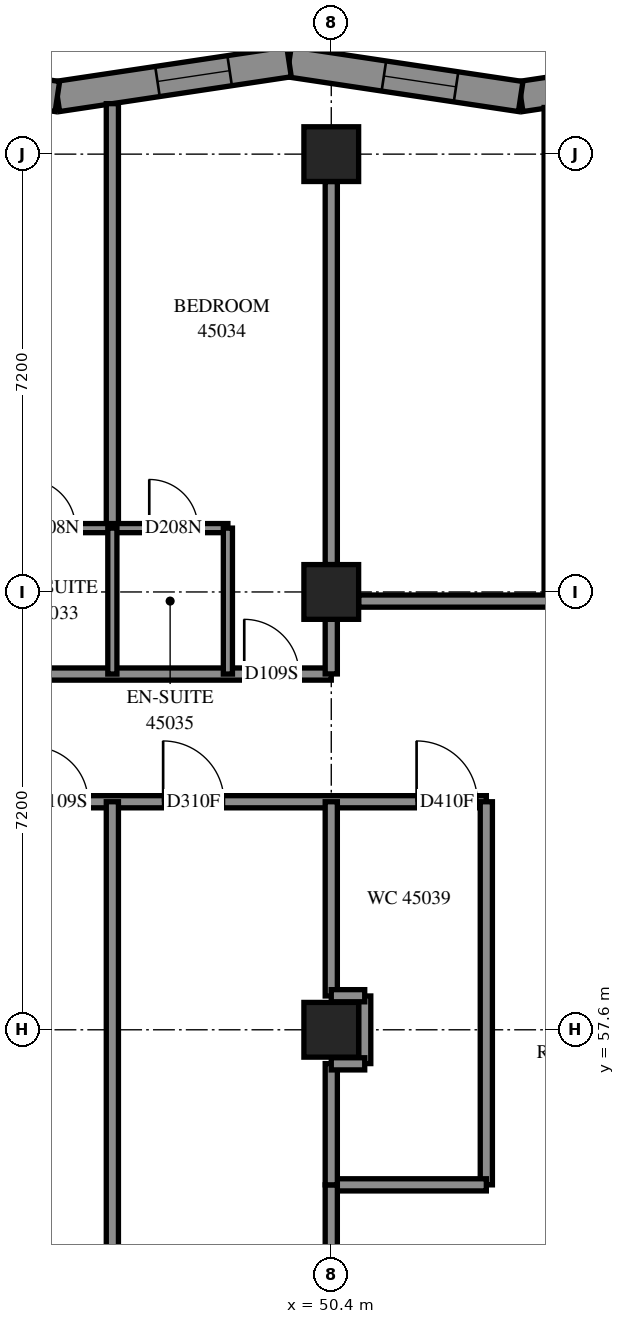
"""IFC4 building model, lengths in metres.
Left out: names, types, materials, properties, quantities, classifications, styles, units other than length and angle.
Written with IfcOpenShell. Run it as: python <this file> out.ifc"""

import sys

from ifc_helpers import new_model, si_unit, direction, frame, frame_2d, origin, origin_2d, place, context, subcontext, project, spatial, polyline, rectangle, outline, extrude, element, fill, save


model = new_model("IFC4")
c1 = context("Model", 3, precision=1e-05, world=origin(), true_north=direction((0.0, 1.0)))
c2 = subcontext(c1, "Body", "Model", "MODEL_VIEW")
j1 = project(units=[si_unit("LENGTHUNIT", "METRE"), si_unit("PLANEANGLEUNIT", "RADIAN")], contexts=[c1])
p1 = place(None, origin())
s1 = spatial("IfcSite", under=j1, at=p1, CompositionType="ELEMENT")
p2 = place(p1, origin())
s2 = spatial("IfcBuilding", under=s1, at=p2, CompositionType="ELEMENT")
p3 = place(p2, frame((0.0, 0.0, 166.0)))
s3 = spatial("IfcBuildingStorey", under=s2, at=p3, CompositionType="ELEMENT", Elevation=166.0)
for number, where, z_axis, x_axis in (
    (1, (50.4, 57.6, 0.0), (0.0, 0.0, 1.0), (1.0, 0.0, 0.0)),
    (2, (50.4, 64.8, 0.0), (0.0, 0.0, 1.0), (1.0, 0.0, 0.0)),
    (3, (50.4, 72.0, 0.0), (0.0, 0.0, 1.0), (1.0, 0.0, 0.0)),
):
    element("IfcColumn", number, at=place(p3, frame(where, z_axis=z_axis, x_axis=x_axis)), inside=s3, PredefinedType="COLUMN", context=c2, shape_type="SweptSolid", body=[
        extrude(rectangle(XDim=0.9, YDim=0.9, at=origin_2d()), origin(), (0.0, 0.0, 1.0), 3.1),
    ])
p4 = place(p3, frame((57.325, 73.519, 0.0), z_axis=(0.0, 0.0, 1.0), x_axis=(-0.9889155896, -0.1484788086, 0.0)))
e4 = element("IfcWall", 4, at=p4, inside=s3, PredefinedType="SOLIDWALL", context=c2, shape_type="SweptSolid", body=[
    extrude(outline(polyline([(-0.037, -0.25), (3.815, -0.25), (3.89, 0.25), (0.037, 0.25), (-0.037, -0.25)])), origin(), (0.0, 0.0, 1.0), 3.1),
])
p5 = place(p4, frame((0.4, 0.0, 0.45)))
e5 = element("IfcOpeningElement", 5, at=p5, cuts=e4, PredefinedType="OPENING", context=c2, shape_type="SweptSolid", body=[
    extrude(rectangle(XDim=2.8, YDim=2.5, at=frame_2d((1.4, 1.25))), frame((0.0, 0.26, 0.0), z_axis=(0.0, -1.0, 0.0), x_axis=(1.0, 0.0, 0.0)), (0.0, 0.0, 1.0), 0.52),
])
p6 = place(p3, frame((53.515, 72.947, 0.0), z_axis=(0.0, 0.0, 1.0), x_axis=(-0.9889150173, 0.1484826202, 0.0)))
e6 = element("IfcWall", 6, at=p6, inside=s3, PredefinedType="SOLIDWALL", context=c2, shape_type="SweptSolid", body=[
    extrude(outline(polyline([(0.037, -0.25), (3.89, -0.25), (3.815, 0.25), (-0.037, 0.25), (0.037, -0.25)])), origin(), (0.0, 0.0, 1.0), 3.1),
])
p7 = place(p6, frame((1.075, 0.0, 0.45)))
e7 = element("IfcOpeningElement", 7, at=p7, cuts=e6, PredefinedType="OPENING", context=c2, shape_type="SweptSolid", body=[
    extrude(rectangle(XDim=1.2, YDim=2.5, at=frame_2d((0.6, 1.25))), frame((0.0, 0.26, 0.0), z_axis=(0.0, -1.0, 0.0), x_axis=(1.0, 0.0, 0.0)), (0.0, 0.0, 1.0), 0.52),
])
p8 = place(p3, frame((49.705, 73.519, 0.0), z_axis=(0.0, 0.0, 1.0), x_axis=(-0.9889155896, -0.1484788086, 0.0)))
e8 = element("IfcWall", 8, at=p8, inside=s3, PredefinedType="SOLIDWALL", context=c2, shape_type="SweptSolid", body=[
    extrude(outline(polyline([(-0.037, -0.25), (3.815, -0.25), (3.89, 0.25), (0.037, 0.25), (-0.037, -0.25)])), origin(), (0.0, 0.0, 1.0), 3.1),
])
p9 = place(p8, frame((0.988, 0.0, 0.45)))
e9 = element("IfcOpeningElement", 9, at=p9, cuts=e8, PredefinedType="OPENING", context=c2, shape_type="SweptSolid", body=[
    extrude(rectangle(XDim=1.2, YDim=2.5, at=frame_2d((0.6, 1.25))), frame((0.0, 0.26, 0.0), z_axis=(0.0, -1.0, 0.0), x_axis=(1.0, 0.0, 0.0)), (0.0, 0.0, 1.0), 0.52),
])
p10 = place(p3, frame((45.896, 72.947, 0.0), z_axis=(0.0, 0.0, 1.0), x_axis=(-0.9889150173, 0.1484826202, 0.0)))
e10 = element("IfcWall", 10, at=p10, inside=s3, PredefinedType="SOLIDWALL", context=c2, shape_type="SweptSolid", body=[
    extrude(outline(polyline([(0.037, -0.25), (3.89, -0.25), (3.815, 0.25), (-0.037, 0.25), (0.037, -0.25)])), origin(), (0.0, 0.0, 1.0), 3.1),
])
p11 = place(p10, frame((0.863, 0.0, 0.45)))
e11 = element("IfcOpeningElement", 11, at=p11, cuts=e10, PredefinedType="OPENING", context=c2, shape_type="SweptSolid", body=[
    extrude(rectangle(XDim=1.2, YDim=2.5, at=frame_2d((0.6, 1.25))), frame((0.0, 0.26, 0.0), z_axis=(0.0, -1.0, 0.0), x_axis=(1.0, 0.0, 0.0)), (0.0, 0.0, 1.0), 0.52),
])
p12 = place(p3, frame((36.0, 61.35, 0.0), z_axis=(0.0, 0.0, 1.0), x_axis=(1.0, 0.0, 0.0)))
e12 = element("IfcWall", 12, at=p12, inside=s3, PredefinedType="PARTITIONING", context=c2, shape_type="SweptSolid", body=[
    extrude(rectangle(XDim=16.95, YDim=0.2, at=frame_2d((8.475, 0.0))), origin(), (0.0, 0.0, 1.0), 3.1),
])
p13 = place(p12, frame((2.3, 0.0, 0.0)))
e13 = element("IfcOpeningElement", 13, at=p13, cuts=e12, PredefinedType="OPENING", context=c2, shape_type="SweptSolid", body=[
    extrude(rectangle(XDim=0.9, YDim=2.1, at=frame_2d((0.45, 1.05))), frame((0.0, 0.11, 0.0), z_axis=(0.0, -1.0, 0.0), x_axis=(1.0, 0.0, 0.0)), (0.0, 0.0, 1.0), 0.22),
])
p14 = place(p12, frame((4.125, 0.0, 0.0)))
e14 = element("IfcOpeningElement", 14, at=p14, cuts=e12, PredefinedType="OPENING", context=c2, shape_type="SweptSolid", body=[
    extrude(rectangle(XDim=1.0, YDim=2.1, at=frame_2d((0.5, 1.05))), frame((0.0, 0.11, 0.0), z_axis=(0.0, -1.0, 0.0), x_axis=(1.0, 0.0, 0.0)), (0.0, 0.0, 1.0), 0.22),
])
p15 = place(p12, frame((9.5, 0.0, 0.0)))
e15 = element("IfcOpeningElement", 15, at=p15, cuts=e12, PredefinedType="OPENING", context=c2, shape_type="SweptSolid", body=[
    extrude(rectangle(XDim=0.9, YDim=2.1, at=frame_2d((0.45, 1.05))), frame((0.0, 0.11, 0.0), z_axis=(0.0, -1.0, 0.0), x_axis=(1.0, 0.0, 0.0)), (0.0, 0.0, 1.0), 0.22),
])
p16 = place(p12, frame((11.635, 0.0, 0.0)))
e16 = element("IfcOpeningElement", 16, at=p16, cuts=e12, PredefinedType="OPENING", context=c2, shape_type="SweptSolid", body=[
    extrude(rectangle(XDim=1.0, YDim=2.1, at=frame_2d((0.5, 1.05))), frame((0.0, 0.11, 0.0), z_axis=(0.0, -1.0, 0.0), x_axis=(1.0, 0.0, 0.0)), (0.0, 0.0, 1.0), 0.22),
])
p17 = place(p12, frame((15.803, 0.0, 0.0)))
e17 = element("IfcOpeningElement", 17, at=p17, cuts=e12, PredefinedType="OPENING", context=c2, shape_type="SweptSolid", body=[
    extrude(rectangle(XDim=1.0, YDim=2.1, at=frame_2d((0.5, 1.05))), frame((0.0, 0.11, 0.0), z_axis=(0.0, -1.0, 0.0), x_axis=(1.0, 0.0, 0.0)), (0.0, 0.0, 1.0), 0.22),
])
p18 = place(p3, frame((46.8, 49.7, 0.0), z_axis=(0.0, 0.0, 1.0), x_axis=(0.0, 1.0, 0.0)))
e18 = element("IfcWall", 18, at=p18, inside=s3, PredefinedType="PARTITIONING", context=c2, shape_type="SweptSolid", body=[
    extrude(rectangle(XDim=11.65, YDim=0.2, at=frame_2d((5.825, 0.0))), origin(), (0.0, 0.0, 1.0), 3.1),
])
p19 = place(p3, frame((40.65, 63.45, 0.0), z_axis=(0.0, 0.0, 1.0), x_axis=(1.0, 0.0, 0.0)))
e19 = element("IfcWall", 19, at=p19, inside=s3, PredefinedType="PARTITIONING", context=c2, shape_type="SweptSolid", body=[
    extrude(rectangle(XDim=9.75, YDim=0.2, at=frame_2d((4.875, 0.0))), origin(), (0.0, 0.0, 1.0), 3.1),
])
p20 = place(p19, frame((0.144, 0.0, 0.0)))
e20 = element("IfcOpeningElement", 20, at=p20, cuts=e19, PredefinedType="OPENING", context=c2, shape_type="SweptSolid", body=[
    extrude(rectangle(XDim=1.0, YDim=2.1, at=frame_2d((0.5, 1.05))), frame((0.0, 0.11, 0.0), z_axis=(0.0, -1.0, 0.0), x_axis=(1.0, 0.0, 0.0)), (0.0, 0.0, 1.0), 0.22),
])
p21 = place(p19, frame((3.102, 0.0, 0.0)))
e21 = element("IfcOpeningElement", 21, at=p21, cuts=e19, PredefinedType="OPENING", context=c2, shape_type="SweptSolid", body=[
    extrude(rectangle(XDim=0.9, YDim=2.1, at=frame_2d((0.45, 1.05))), frame((0.0, 0.11, 0.0), z_axis=(0.0, -1.0, 0.0), x_axis=(1.0, 0.0, 0.0)), (0.0, 0.0, 1.0), 0.22),
])
p22 = place(p19, frame((8.319, 0.0, 0.0)))
e22 = element("IfcOpeningElement", 22, at=p22, cuts=e19, PredefinedType="OPENING", context=c2, shape_type="SweptSolid", body=[
    extrude(rectangle(XDim=0.9, YDim=2.1, at=frame_2d((0.45, 1.05))), frame((0.0, 0.11, 0.0), z_axis=(0.0, -1.0, 0.0), x_axis=(1.0, 0.0, 0.0)), (0.0, 0.0, 1.0), 0.22),
])
p23 = place(p3, frame((54.0, 64.65, 0.0), z_axis=(0.0, 0.0, 1.0), x_axis=(0.0, 1.0, 0.0)))
e23 = element("IfcWall", 23, at=p23, inside=s3, PredefinedType="PARTITIONING", context=c2, shape_type="SweptSolid", body=[
    extrude(rectangle(XDim=8.117, YDim=0.2, at=frame_2d((4.059, 0.0))), origin(), (0.0, 0.0, 1.0), 3.1),
])
p24 = place(p3, frame((46.8, 65.85, 0.0), z_axis=(0.0, 0.0, 1.0), x_axis=(0.0, 1.0, 0.0)))
e24 = element("IfcWall", 24, at=p24, inside=s3, PredefinedType="PARTITIONING", context=c2, shape_type="SweptSolid", body=[
    extrude(rectangle(XDim=6.98, YDim=0.2, at=frame_2d((3.49, 0.0))), origin(), (0.0, 0.0, 1.0), 3.1),
])
for number, where, z_axis, x_axis in (
    (25, (52.95, 55.05, 0.0), (0.0, 0.0, 1.0), (0.0, 1.0, 0.0)),
    (26, (50.4, 65.25, 0.0), (0.0, 0.0, 1.0), (0.0, 1.0, 0.0)),
):
    element("IfcWall", number, at=place(p3, frame(where, z_axis=z_axis, x_axis=x_axis)), inside=s3, PredefinedType="PARTITIONING", context=c2, shape_type="SweptSolid", body=[
        extrude(rectangle(XDim=6.3, YDim=0.2, at=frame_2d((3.15, 0.0))), origin(), (0.0, 0.0, 1.0), 3.1),
    ])
p25 = place(p3, frame((50.85, 64.65, 0.0), z_axis=(0.0, 0.0, 1.0), x_axis=(1.0, 0.0, 0.0)))
e27 = element("IfcWall", 27, at=p25, inside=s3, PredefinedType="PARTITIONING", context=c2, shape_type="SweptSolid", body=[
    extrude(rectangle(XDim=4.65, YDim=0.2, at=frame_2d((2.325, 0.0))), origin(), (0.0, 0.0, 1.0), 3.1),
])
p26 = place(p25, frame((3.509, 0.0, 0.0)))
e28 = element("IfcOpeningElement", 28, at=p26, cuts=e27, PredefinedType="OPENING", context=c2, shape_type="SweptSolid", body=[
    extrude(rectangle(XDim=1.0, YDim=2.1, at=frame_2d((0.5, 1.05))), frame((0.0, 0.11, 0.0), z_axis=(0.0, -1.0, 0.0), x_axis=(1.0, 0.0, 0.0)), (0.0, 0.0, 1.0), 0.22),
])
p27 = place(p3, frame((44.9, 65.85, 0.0), z_axis=(0.0, 0.0, 1.0), x_axis=(1.0, 0.0, 0.0)))
e29 = element("IfcWall", 29, at=p27, inside=s3, PredefinedType="PARTITIONING", context=c2, shape_type="SweptSolid", body=[
    extrude(rectangle(XDim=3.8, YDim=0.15, at=frame_2d((1.9, 0.0))), origin(), (0.0, 0.0, 1.0), 3.1),
])
p28 = place(p27, frame((0.493, 0.0, 0.0)))
e30 = element("IfcOpeningElement", 30, at=p28, cuts=e29, PredefinedType="OPENING", context=c2, shape_type="SweptSolid", body=[
    extrude(rectangle(XDim=0.8, YDim=2.1, at=frame_2d((0.4, 1.05))), frame((0.0, 0.085, 0.0), z_axis=(0.0, -1.0, 0.0), x_axis=(1.0, 0.0, 0.0)), (0.0, 0.0, 1.0), 0.17),
])
p29 = place(p27, frame((2.507, 0.0, 0.0)))
e31 = element("IfcOpeningElement", 31, at=p29, cuts=e29, PredefinedType="OPENING", context=c2, shape_type="SweptSolid", body=[
    extrude(rectangle(XDim=0.8, YDim=2.1, at=frame_2d((0.4, 1.05))), frame((0.0, 0.085, 0.0), z_axis=(0.0, -1.0, 0.0), x_axis=(1.0, 0.0, 0.0)), (0.0, 0.0, 1.0), 0.17),
])
p30 = place(p3, frame((50.4, 58.156, 0.0), z_axis=(0.0, 0.0, 1.0), x_axis=(0.0, 1.0, 0.0)))
e32 = element("IfcWall", 32, at=p30, inside=s3, PredefinedType="PARTITIONING", context=c2, shape_type="SweptSolid", body=[
    extrude(rectangle(XDim=3.194, YDim=0.2, at=frame_2d((1.597, 0.0))), origin(), (0.0, 0.0, 1.0), 3.1),
])
p31 = place(p3, frame((50.4, 55.05, 0.0), z_axis=(0.0, 0.0, 1.0), x_axis=(1.0, 0.0, 0.0)))
e33 = element("IfcWall", 33, at=p31, inside=s3, PredefinedType="PARTITIONING", context=c2, shape_type="SweptSolid", body=[
    extrude(rectangle(XDim=2.55, YDim=0.2, at=frame_2d((1.275, 0.0))), origin(), (0.0, 0.0, 1.0), 3.1),
])
for number, where, z_axis, x_axis in (
    (34, (46.8, 63.45, 0.0), (0.0, 0.0, 1.0), (0.0, 1.0, 0.0)),
    (35, (48.7, 63.45, 0.0), (0.0, 0.0, 1.0), (0.0, 1.0, 0.0)),
):
    element("IfcWall", number, at=place(p3, frame(where, z_axis=z_axis, x_axis=x_axis)), inside=s3, PredefinedType="PARTITIONING", context=c2, shape_type="SweptSolid", body=[
        extrude(rectangle(XDim=2.4, YDim=0.15, at=frame_2d((1.2, 0.0))), origin(), (0.0, 0.0, 1.0), 3.1),
    ])
p32 = place(p3, frame((50.4, 52.95, 0.0), z_axis=(0.0, 0.0, 1.0), x_axis=(0.0, 1.0, 0.0)))
e36 = element("IfcWall", 36, at=p32, inside=s3, PredefinedType="PARTITIONING", context=c2, shape_type="SweptSolid", body=[
    extrude(rectangle(XDim=2.1, YDim=0.2, at=frame_2d((1.05, 0.0))), origin(), (0.0, 0.0, 1.0), 3.1),
])
p33 = place(p3, frame((50.4, 55.05, 0.0), z_axis=(0.0, 0.0, 1.0), x_axis=(0.0, 1.0, 0.0)))
e37 = element("IfcWall", 37, at=p33, inside=s3, PredefinedType="PARTITIONING", context=c2, shape_type="SweptSolid", body=[
    extrude(rectangle(XDim=1.994, YDim=0.2, at=frame_2d((0.997, 0.0))), origin(), (0.0, 0.0, 1.0), 3.1),
])
p34 = place(p3, frame((50.95, 57.044, 0.0), z_axis=(0.0, 0.0, 1.0), x_axis=(0.0, 1.0, 0.0)))
e38 = element("IfcWall", 38, at=p34, inside=s3, PredefinedType="PARTITIONING", context=c2, shape_type="SweptSolid", body=[
    extrude(rectangle(XDim=1.112, YDim=0.2, at=frame_2d((0.556, 0.0))), origin(), (0.0, 0.0, 1.0), 3.1),
])
p35 = place(p3, frame((50.4, 63.452, 0.0), z_axis=(0.0, 0.0, 1.0), x_axis=(0.0, 1.0, 0.0)))
e39 = element("IfcWall", 39, at=p35, inside=s3, PredefinedType="PARTITIONING", context=c2, shape_type="SweptSolid", body=[
    extrude(rectangle(XDim=0.898, YDim=0.2, at=frame_2d((0.449, 0.0))), origin(), (0.0, 0.0, 1.0), 3.1),
])
for number, where, z_axis, x_axis in (
    (40, (50.4, 58.16, 0.0), (0.0, 0.0, 1.0), (1.0, 0.0, 0.0)),
    (41, (50.4, 57.04, 0.0), (0.0, 0.0, 1.0), (1.0, 0.0, 0.0)),
):
    element("IfcWall", number, at=place(p3, frame(where, z_axis=z_axis, x_axis=x_axis)), inside=s3, PredefinedType="PARTITIONING", context=c2, shape_type="SweptSolid", body=[
        extrude(rectangle(XDim=0.55, YDim=0.2, at=frame_2d((0.275, 0.0))), origin(), (0.0, 0.0, 1.0), 3.1),
    ])
p36 = place(p7, origin())
e42 = element("IfcWindow", 42, at=p36, inside=s3, PartitioningType="SINGLE_PANEL", PredefinedType="WINDOW", context=c2, shape_type="SweptSolid", body=[
    extrude(rectangle(XDim=1.2, YDim=2.5, at=frame_2d((0.6, 1.25))), frame((0.0, 0.18, 0.0), z_axis=(0.0, -1.0, 0.0), x_axis=(1.0, 0.0, 0.0)), (0.0, 0.0, 1.0), 0.06),
])
fill(e7, e42)
p37 = place(p9, origin())
e43 = element("IfcWindow", 43, at=p37, inside=s3, PartitioningType="SINGLE_PANEL", PredefinedType="WINDOW", context=c2, shape_type="SweptSolid", body=[
    extrude(rectangle(XDim=1.2, YDim=2.5, at=frame_2d((0.6, 1.25))), frame((0.0, 0.18, 0.0), z_axis=(0.0, -1.0, 0.0), x_axis=(1.0, 0.0, 0.0)), (0.0, 0.0, 1.0), 0.06),
])
fill(e9, e43)
p38 = place(p15, origin())
e44 = element("IfcDoor", 44, at=p38, inside=s3, OperationType="SINGLE_SWING_LEFT", PredefinedType="DOOR", context=c2, shape_type="SweptSolid", body=[
    extrude(rectangle(XDim=0.9, YDim=2.1, at=frame_2d((0.45, 1.05))), frame((0.0, 0.025, 0.0), z_axis=(0.0, -1.0, 0.0), x_axis=(1.0, 0.0, 0.0)), (0.0, 0.0, 1.0), 0.05),
])
fill(e15, e44)
p39 = place(p28, origin())
e45 = element("IfcDoor", 45, at=p39, inside=s3, OperationType="SINGLE_SWING_RIGHT", PredefinedType="DOOR", context=c2, shape_type="SweptSolid", body=[
    extrude(rectangle(XDim=0.8, YDim=2.1, at=frame_2d((0.4, 1.05))), frame((0.0, 0.025, 0.0), z_axis=(0.0, -1.0, 0.0), x_axis=(1.0, 0.0, 0.0)), (0.0, 0.0, 1.0), 0.05),
])
fill(e30, e45)
p40 = place(p22, origin())
e46 = element("IfcDoor", 46, at=p40, inside=s3, OperationType="SINGLE_SWING_LEFT", PredefinedType="DOOR", context=c2, shape_type="SweptSolid", body=[
    extrude(rectangle(XDim=0.9, YDim=2.1, at=frame_2d((0.45, 1.05))), frame((0.0, 0.025, 0.0), z_axis=(0.0, -1.0, 0.0), x_axis=(1.0, 0.0, 0.0)), (0.0, 0.0, 1.0), 0.05),
])
fill(e22, e46)
p41 = place(p29, origin())
e47 = element("IfcDoor", 47, at=p41, inside=s3, OperationType="SINGLE_SWING_RIGHT", PredefinedType="DOOR", context=c2, shape_type="SweptSolid", body=[
    extrude(rectangle(XDim=0.8, YDim=2.1, at=frame_2d((0.4, 1.05))), frame((0.0, 0.025, 0.0), z_axis=(0.0, -1.0, 0.0), x_axis=(1.0, 0.0, 0.0)), (0.0, 0.0, 1.0), 0.05),
])
fill(e31, e47)
p42 = place(p16, origin())
e48 = element("IfcDoor", 48, at=p42, inside=s3, OperationType="SINGLE_SWING_RIGHT", PredefinedType="DOOR", context=c2, shape_type="SweptSolid", body=[
    extrude(rectangle(XDim=1.0, YDim=2.1, at=frame_2d((0.5, 1.05))), frame((0.0, 0.025, 0.0), z_axis=(0.0, -1.0, 0.0), x_axis=(1.0, 0.0, 0.0)), (0.0, 0.0, 1.0), 0.05),
])
fill(e16, e48)
p43 = place(p17, origin())
e49 = element("IfcDoor", 49, at=p43, inside=s3, OperationType="SINGLE_SWING_LEFT", PredefinedType="DOOR", context=c2, shape_type="SweptSolid", body=[
    extrude(rectangle(XDim=1.0, YDim=2.1, at=frame_2d((0.5, 1.05))), frame((0.0, 0.025, 0.0), z_axis=(0.0, -1.0, 0.0), x_axis=(1.0, 0.0, 0.0)), (0.0, 0.0, 1.0), 0.05),
])
fill(e17, e49)
save(model, sys.argv[1])
